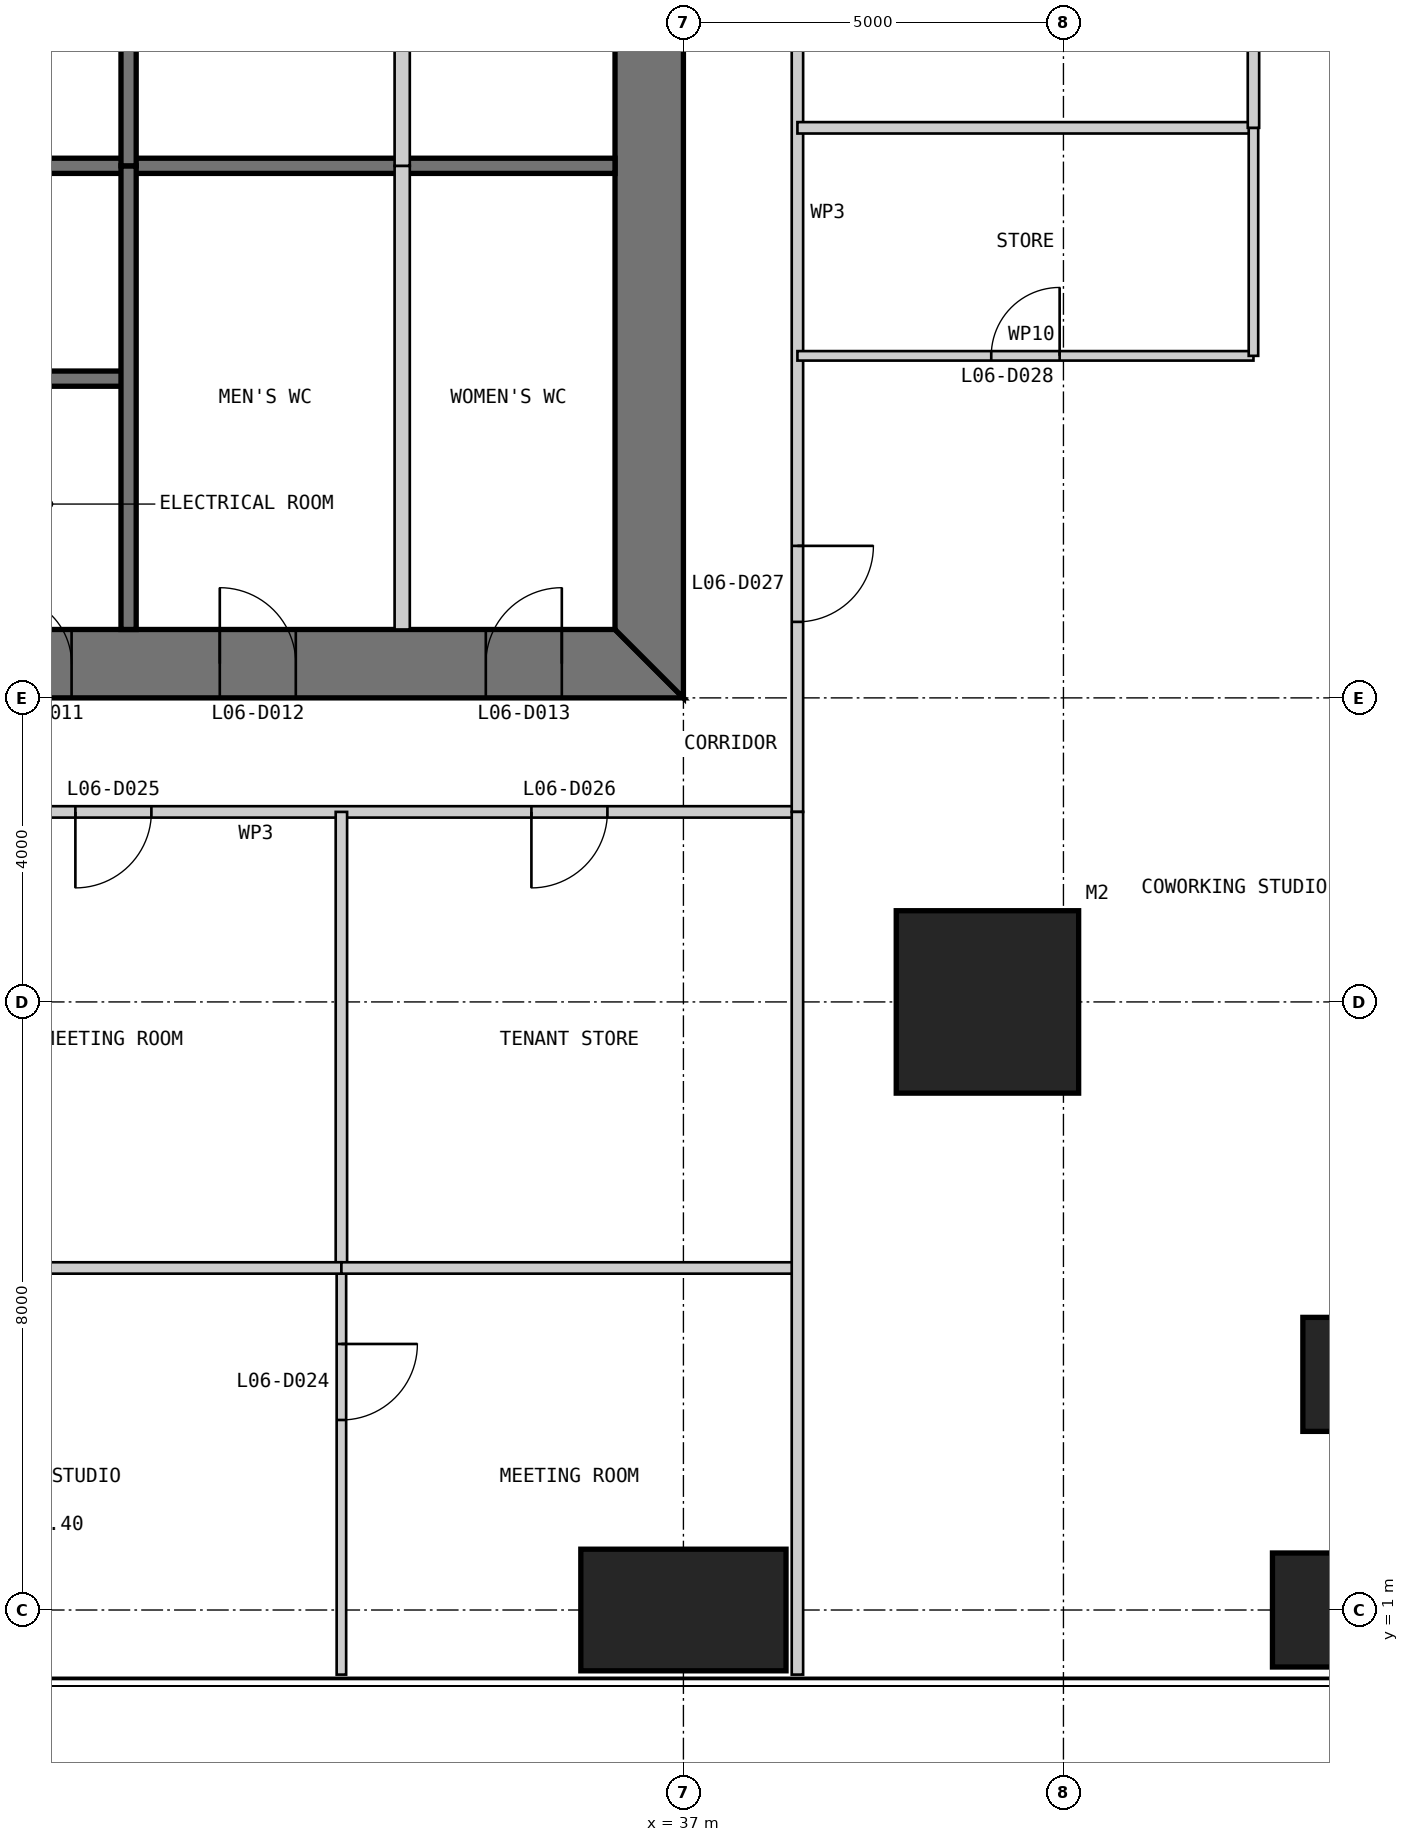
"""IFC4 building model, lengths in metres.
Left out: names, types, materials, properties, quantities, classifications, styles, units other than length and angle.
Written with IfcOpenShell. Run it as: python <this file> out.ifc"""

import sys

from ifc_helpers import new_model, si_unit, direction, frame, frame_2d, origin, origin_2d, place, context, subcontext, project, spatial, polyline, rectangle, outline, extrude, element, fill, save


model = new_model("IFC4")
c1 = context("Model", 3, precision=1e-05, world=origin(), true_north=direction((0.0, 1.0)))
c2 = subcontext(c1, "Body", "Model", "MODEL_VIEW")
j1 = project(units=[si_unit("LENGTHUNIT", "METRE"), si_unit("PLANEANGLEUNIT", "RADIAN")], contexts=[c1])
p1 = place(None, origin())
s1 = spatial("IfcSite", under=j1, at=p1, CompositionType="ELEMENT")
p2 = place(p1, origin())
s2 = spatial("IfcBuilding", under=s1, at=p2, CompositionType="ELEMENT")
p3 = place(p2, frame((0.0, 0.0, 31.0)))
s3 = spatial("IfcBuildingStorey", under=s2, at=p3, CompositionType="ELEMENT", Elevation=31.0)
p4 = place(p3, frame((41.0, 9.0, 0.0), z_axis=(0.0, 0.0, 1.0), x_axis=(1.0, 0.0, 0.0)))
e1 = element("IfcColumn", 1, at=p4, inside=s3, PredefinedType="COLUMN", context=c2, shape_type="SweptSolid", body=[
    extrude(rectangle(XDim=2.4, YDim=2.4, at=origin_2d()), origin(), (0.0, 0.0, 1.0), 4.0),
])
p5 = place(p3, frame((37.0, 1.0, 0.0), z_axis=(0.0, 0.0, 1.0), x_axis=(1.0, 0.0, 0.0)))
e2 = element("IfcColumn", 2, at=p5, inside=s3, PredefinedType="COLUMN", context=c2, shape_type="SweptSolid", body=[
    extrude(rectangle(XDim=2.7, YDim=1.6, at=origin_2d()), origin(), (0.0, 0.0, 1.0), 4.0),
])
for number, where, z_axis, x_axis in (
    (3, (45.5, 1.0, 0.0), (0.0, 0.0, 1.0), (1.0, 0.0, 0.0)),
    (4, (45.9, 4.1, 0.0), (0.0, 0.0, 1.0), (1.0, 0.0, 0.0)),
):
    element("IfcColumn", number, at=place(p3, frame(where, z_axis=z_axis, x_axis=x_axis)), inside=s3, PredefinedType="COLUMN", context=c2, shape_type="SweptSolid", body=[
        extrude(rectangle(XDim=1.5, YDim=1.5, at=origin_2d()), origin(), (0.0, 0.0, 1.0), 4.0),
    ])
p6 = place(p3, frame((13.0, 13.45, 0.0), z_axis=(0.0, 0.0, 1.0), x_axis=(1.0, 0.0, 0.0)))
e5 = element("IfcWall", 5, at=p6, inside=s3, PredefinedType="SHEAR", context=c2, shape_type="SweptSolid", body=[
    extrude(outline(polyline([(0.0, -0.45), (24.0, -0.45), (23.1, 0.45), (0.9, 0.45), (0.0, -0.45)])), origin(), (0.0, 0.0, 1.0), 4.0),
])
p7 = place(p6, frame((4.9, 0.0, 0.0)))
e6 = element("IfcOpeningElement", 6, at=p7, cuts=e5, PredefinedType="OPENING", context=c2, shape_type="SweptSolid", body=[
    extrude(rectangle(XDim=1.0, YDim=2.2, at=frame_2d((0.5, 1.1))), frame((0.0, 0.46, 0.0), z_axis=(0.0, -1.0, 0.0), x_axis=(1.0, 0.0, 0.0)), (0.0, 0.0, 1.0), 0.92),
])
p8 = place(p6, frame((8.9, 0.0, 0.0)))
e7 = element("IfcOpeningElement", 7, at=p8, cuts=e5, PredefinedType="OPENING", context=c2, shape_type="SweptSolid", body=[
    extrude(rectangle(XDim=1.1, YDim=2.2, at=frame_2d((0.55, 1.1))), frame((0.0, 0.46, 0.0), z_axis=(0.0, -1.0, 0.0), x_axis=(1.0, 0.0, 0.0)), (0.0, 0.0, 1.0), 0.92),
])
p9 = place(p6, frame((15.05, 0.0, 0.0)))
e8 = element("IfcOpeningElement", 8, at=p9, cuts=e5, PredefinedType="OPENING", context=c2, shape_type="SweptSolid", body=[
    extrude(rectangle(XDim=0.9, YDim=2.2, at=frame_2d((0.45, 1.1))), frame((0.0, 0.46, 0.0), z_axis=(0.0, -1.0, 0.0), x_axis=(1.0, 0.0, 0.0)), (0.0, 0.0, 1.0), 0.92),
])
p10 = place(p6, frame((17.9, 0.0, 0.0)))
e9 = element("IfcOpeningElement", 9, at=p10, cuts=e5, PredefinedType="OPENING", context=c2, shape_type="SweptSolid", body=[
    extrude(rectangle(XDim=1.0, YDim=2.2, at=frame_2d((0.5, 1.1))), frame((0.0, 0.46, 0.0), z_axis=(0.0, -1.0, 0.0), x_axis=(1.0, 0.0, 0.0)), (0.0, 0.0, 1.0), 0.92),
])
p11 = place(p6, frame((21.4, 0.0, 0.0)))
e10 = element("IfcOpeningElement", 10, at=p11, cuts=e5, PredefinedType="OPENING", context=c2, shape_type="SweptSolid", body=[
    extrude(rectangle(XDim=1.0, YDim=2.2, at=frame_2d((0.5, 1.1))), frame((0.0, 0.46, 0.0), z_axis=(0.0, -1.0, 0.0), x_axis=(1.0, 0.0, 0.0)), (0.0, 0.0, 1.0), 0.92),
])
p12 = place(p3, frame((36.55, 13.9, 0.0), z_axis=(0.0, 0.0, 1.0), x_axis=(0.0, 1.0, 0.0)))
e11 = element("IfcWall", 11, at=p12, inside=s3, PredefinedType="SHEAR", context=c2, shape_type="SweptSolid", body=[
    extrude(outline(polyline([(-0.9, -0.45), (23.1, -0.45), (22.2, 0.45), (0.0, 0.45), (-0.9, -0.45)])), origin(), (0.0, 0.0, 1.0), 4.0),
])
p13 = place(p12, frame((20.2, 0.0, 0.0)))
e12 = element("IfcOpeningElement", 12, at=p13, cuts=e11, PredefinedType="OPENING", context=c2, shape_type="SweptSolid", body=[
    extrude(rectangle(XDim=1.0, YDim=2.2, at=frame_2d((0.5, 1.1))), frame((0.0, 0.46, 0.0), z_axis=(0.0, -1.0, 0.0), x_axis=(1.0, 0.0, 0.0)), (0.0, 0.0, 1.0), 0.92),
])
p14 = place(p12, frame((17.25, 0.0, 0.0)))
e13 = element("IfcOpeningElement", 13, at=p14, cuts=e11, PredefinedType="OPENING", context=c2, shape_type="SweptSolid", body=[
    extrude(rectangle(XDim=0.9, YDim=2.2, at=frame_2d((0.45, 1.1))), frame((0.0, 0.46, 0.0), z_axis=(0.0, -1.0, 0.0), x_axis=(1.0, 0.0, 0.0)), (0.0, 0.0, 1.0), 0.92),
])
p15 = place(p3, frame((20.3, 17.2, 0.0), z_axis=(0.0, 0.0, 1.0), x_axis=(1.0, 0.0, 0.0)))
e14 = element("IfcWall", 14, at=p15, inside=s3, PredefinedType="SOLIDWALL", context=c2, shape_type="SweptSolid", body=[
    extrude(rectangle(XDim=9.4, YDim=0.2, at=frame_2d((4.7, 0.0))), origin(), (0.0, 0.0, 1.0), 3.8),
])
p16 = place(p15, frame((0.25, 0.0, 0.0)))
e15 = element("IfcOpeningElement", 15, at=p16, cuts=e14, PredefinedType="OPENING", context=c2, shape_type="SweptSolid", body=[
    extrude(rectangle(XDim=1.0, YDim=2.2, at=frame_2d((0.5, 1.1))), frame((0.0, 0.11, 0.0), z_axis=(0.0, -1.0, 0.0), x_axis=(1.0, 0.0, 0.0)), (0.0, 0.0, 1.0), 0.22),
])
p17 = place(p3, frame((20.3, 20.0, 0.0), z_axis=(0.0, 0.0, 1.0), x_axis=(1.0, 0.0, 0.0)))
e16 = element("IfcWall", 16, at=p17, inside=s3, PredefinedType="SOLIDWALL", context=c2, shape_type="SweptSolid", body=[
    extrude(rectangle(XDim=15.8, YDim=0.2, at=frame_2d((7.9, 0.0))), origin(), (0.0, 0.0, 1.0), 3.8),
])
p18 = place(p3, frame((29.7, 13.9, 0.0), z_axis=(0.0, 0.0, 1.0), x_axis=(0.0, 1.0, 0.0)))
e17 = element("IfcWall", 17, at=p18, inside=s3, PredefinedType="SOLIDWALL", context=c2, shape_type="SweptSolid", body=[
    extrude(rectangle(XDim=6.1, YDim=0.2, at=frame_2d((3.05, 0.0))), origin(), (0.0, 0.0, 1.0), 3.8),
])
p19 = place(p3, frame((33.3, 13.9, 0.0), z_axis=(0.0, 0.0, 1.0), x_axis=(0.0, 1.0, 0.0)))
e18 = element("IfcWall", 18, at=p19, inside=s3, PredefinedType="PARTITIONING", context=c2, shape_type="SweptSolid", body=[
    extrude(rectangle(XDim=6.1, YDim=0.2, at=frame_2d((3.05, 0.0))), origin(), (0.0, 0.0, 1.0), 3.8),
])
p20 = place(p3, frame((33.3, 36.1, 0.0), z_axis=(0.0, 0.0, 1.0), x_axis=(0.0, -1.0, 0.0)))
e19 = element("IfcWall", 19, at=p20, inside=s3, PredefinedType="PARTITIONING", context=c2, shape_type="SweptSolid", body=[
    extrude(rectangle(XDim=16.1, YDim=0.2, at=frame_2d((8.05, 0.0))), origin(), (0.0, 0.0, 1.0), 3.8),
])
p21 = place(p3, frame((29.7, 36.1, 0.0), z_axis=(0.0, 0.0, 1.0), x_axis=(0.0, -1.0, 0.0)))
e20 = element("IfcWall", 20, at=p21, inside=s3, PredefinedType="SOLIDWALL", context=c2, shape_type="SweptSolid", body=[
    extrude(rectangle(XDim=16.1, YDim=0.2, at=frame_2d((8.05, 0.0))), origin(), (0.0, 0.0, 1.0), 3.8),
])
p22 = place(p3, frame((11.5, 11.5, 0.0), z_axis=(0.0, 0.0, 1.0), x_axis=(1.0, 0.0, 0.0)))
e21 = element("IfcWall", 21, at=p22, inside=s3, PredefinedType="PARTITIONING", context=c2, shape_type="SweptSolid", body=[
    extrude(rectangle(XDim=27.0, YDim=0.15, at=frame_2d((13.5, 0.0))), origin(), (0.0, 0.0, 1.0), 3.85),
])
p23 = place(p22, frame((5.5, 0.0, 0.0)))
e22 = element("IfcOpeningElement", 22, at=p23, cuts=e21, PredefinedType="OPENING", context=c2, shape_type="SweptSolid", body=[
    extrude(rectangle(XDim=1.0, YDim=2.2, at=frame_2d((0.5, 1.1))), frame((0.0, 0.085, 0.0), z_axis=(0.0, -1.0, 0.0), x_axis=(1.0, 0.0, 0.0)), (0.0, 0.0, 1.0), 0.17),
])
p24 = place(p22, frame((17.5, 0.0, 0.0)))
e23 = element("IfcOpeningElement", 23, at=p24, cuts=e21, PredefinedType="OPENING", context=c2, shape_type="SweptSolid", body=[
    extrude(rectangle(XDim=1.0, YDim=2.2, at=frame_2d((0.5, 1.1))), frame((0.0, 0.085, 0.0), z_axis=(0.0, -1.0, 0.0), x_axis=(1.0, 0.0, 0.0)), (0.0, 0.0, 1.0), 0.17),
])
p25 = place(p22, frame((23.5, 0.0, 0.0)))
e24 = element("IfcOpeningElement", 24, at=p25, cuts=e21, PredefinedType="OPENING", context=c2, shape_type="SweptSolid", body=[
    extrude(rectangle(XDim=1.0, YDim=2.2, at=frame_2d((0.5, 1.1))), frame((0.0, 0.085, 0.0), z_axis=(0.0, -1.0, 0.0), x_axis=(1.0, 0.0, 0.0)), (0.0, 0.0, 1.0), 0.17),
])
p26 = place(p3, frame((32.5, 0.15, 0.0), z_axis=(0.0, 0.0, 1.0), x_axis=(0.0, 1.0, 0.0)))
e25 = element("IfcWall", 25, at=p26, inside=s3, PredefinedType="PARTITIONING", context=c2, shape_type="SweptSolid", body=[
    extrude(rectangle(XDim=5.35, YDim=0.125, at=frame_2d((2.675, 0.0))), origin(), (0.0, 0.0, 1.0), 3.85),
])
p27 = place(p26, frame((3.35, 0.0, 0.0)))
e26 = element("IfcOpeningElement", 26, at=p27, cuts=e25, PredefinedType="OPENING", context=c2, shape_type="SweptSolid", body=[
    extrude(rectangle(XDim=1.0, YDim=2.2, at=frame_2d((0.5, 1.1))), frame((0.0, 0.073, 0.0), z_axis=(0.0, -1.0, 0.0), x_axis=(1.0, 0.0, 0.0)), (0.0, 0.0, 1.0), 0.145),
])
for number, where, z_axis, x_axis in (
    (27, (32.5, 5.5, 0.0), (0.0, 0.0, 1.0), (0.0, 1.0, 0.0)),
    (28, (26.5, 5.5, 0.0), (0.0, 0.0, 1.0), (1.0, 0.0, 0.0)),
    (29, (32.5, 5.5, 0.0), (0.0, 0.0, 1.0), (1.0, 0.0, 0.0)),
):
    element("IfcWall", number, at=place(p3, frame(where, z_axis=z_axis, x_axis=x_axis)), inside=s3, PredefinedType="PARTITIONING", context=c2, shape_type="SweptSolid", body=[
        extrude(rectangle(XDim=6.0, YDim=0.15, at=frame_2d((3.0, 0.0))), origin(), (0.0, 0.0, 1.0), 3.85),
    ])
p28 = place(p3, frame((38.5, 11.5, 0.0), z_axis=(0.0, 0.0, 1.0), x_axis=(0.0, 1.0, 0.0)))
e30 = element("IfcWall", 30, at=p28, inside=s3, PredefinedType="PARTITIONING", context=c2, shape_type="SweptSolid", body=[
    extrude(rectangle(XDim=27.0, YDim=0.15, at=frame_2d((13.5, 0.0))), origin(), (0.0, 0.0, 1.0), 3.85),
])
p29 = place(p28, frame((2.5, 0.0, 0.0)))
e31 = element("IfcOpeningElement", 31, at=p29, cuts=e30, PredefinedType="OPENING", context=c2, shape_type="SweptSolid", body=[
    extrude(rectangle(XDim=1.0, YDim=2.2, at=frame_2d((0.5, 1.1))), frame((0.0, 0.085, 0.0), z_axis=(0.0, -1.0, 0.0), x_axis=(1.0, 0.0, 0.0)), (0.0, 0.0, 1.0), 0.17),
])
p30 = place(p28, frame((11.5, 0.0, 0.0)))
e32 = element("IfcOpeningElement", 32, at=p30, cuts=e30, PredefinedType="OPENING", context=c2, shape_type="SweptSolid", body=[
    extrude(rectangle(XDim=1.0, YDim=2.2, at=frame_2d((0.5, 1.1))), frame((0.0, 0.085, 0.0), z_axis=(0.0, -1.0, 0.0), x_axis=(1.0, 0.0, 0.0)), (0.0, 0.0, 1.0), 0.17),
])
p31 = place(p28, frame((17.5, 0.0, 0.0)))
e33 = element("IfcOpeningElement", 33, at=p31, cuts=e30, PredefinedType="OPENING", context=c2, shape_type="SweptSolid", body=[
    extrude(rectangle(XDim=1.0, YDim=2.2, at=frame_2d((0.5, 1.1))), frame((0.0, 0.085, 0.0), z_axis=(0.0, -1.0, 0.0), x_axis=(1.0, 0.0, 0.0)), (0.0, 0.0, 1.0), 0.17),
])
p32 = place(p28, frame((22.0, 0.0, 0.0)))
e34 = element("IfcOpeningElement", 34, at=p32, cuts=e30, PredefinedType="OPENING", context=c2, shape_type="SweptSolid", body=[
    extrude(rectangle(XDim=1.0, YDim=2.2, at=frame_2d((0.5, 1.1))), frame((0.0, 0.085, 0.0), z_axis=(0.0, -1.0, 0.0), x_axis=(1.0, 0.0, 0.0)), (0.0, 0.0, 1.0), 0.17),
])
p33 = place(p28, frame((25.0, 0.0, 0.0)))
e35 = element("IfcOpeningElement", 35, at=p33, cuts=e30, PredefinedType="OPENING", context=c2, shape_type="SweptSolid", body=[
    extrude(rectangle(XDim=1.0, YDim=2.2, at=frame_2d((0.5, 1.1))), frame((0.0, 0.085, 0.0), z_axis=(0.0, -1.0, 0.0), x_axis=(1.0, 0.0, 0.0)), (0.0, 0.0, 1.0), 0.17),
])
p34 = place(p3, frame((38.5, 0.15, 0.0), z_axis=(0.0, 0.0, 1.0), x_axis=(0.0, 1.0, 0.0)))
e36 = element("IfcWall", 36, at=p34, inside=s3, PredefinedType="PARTITIONING", context=c2, shape_type="SweptSolid", body=[
    extrude(rectangle(XDim=11.35, YDim=0.15, at=frame_2d((5.675, 0.0))), origin(), (0.0, 0.0, 1.0), 3.85),
])
p35 = place(p3, frame((44.5, 17.5, 0.0), z_axis=(0.0, 0.0, 1.0), x_axis=(-1.0, 0.0, 0.0)))
e37 = element("IfcWall", 37, at=p35, inside=s3, PredefinedType="PARTITIONING", context=c2, shape_type="SweptSolid", body=[
    extrude(rectangle(XDim=6.0, YDim=0.125, at=frame_2d((3.0, 0.0))), origin(), (0.0, 0.0, 1.0), 3.85),
])
p36 = place(p35, frame((2.55, 0.0, 0.0)))
e38 = element("IfcOpeningElement", 38, at=p36, cuts=e37, PredefinedType="OPENING", context=c2, shape_type="SweptSolid", body=[
    extrude(rectangle(XDim=0.9, YDim=2.2, at=frame_2d((0.45, 1.1))), frame((0.0, 0.073, 0.0), z_axis=(0.0, -1.0, 0.0), x_axis=(1.0, 0.0, 0.0)), (0.0, 0.0, 1.0), 0.145),
])
p37 = place(p3, frame((44.5, 20.5, 0.0), z_axis=(0.0, 0.0, 1.0), x_axis=(-1.0, 0.0, 0.0)))
e39 = element("IfcWall", 39, at=p37, inside=s3, PredefinedType="PARTITIONING", context=c2, shape_type="SweptSolid", body=[
    extrude(rectangle(XDim=6.0, YDim=0.15, at=frame_2d((3.0, 0.0))), origin(), (0.0, 0.0, 1.0), 3.85),
])
p38 = place(p3, frame((44.5, 17.5, 0.0), z_axis=(0.0, 0.0, 1.0), x_axis=(0.0, 1.0, 0.0)))
e40 = element("IfcWall", 40, at=p38, inside=s3, PredefinedType="PARTITIONING", context=c2, shape_type="SweptSolid", body=[
    extrude(rectangle(XDim=3.0, YDim=0.125, at=frame_2d((1.5, 0.0))), origin(), (0.0, 0.0, 1.0), 3.85),
])
p39 = place(p3, frame((44.5, 20.5, 0.0), z_axis=(0.0, 0.0, 1.0), x_axis=(0.0, 1.0, 0.0)))
e41 = element("IfcWall", 41, at=p39, inside=s3, PredefinedType="PARTITIONING", context=c2, shape_type="SweptSolid", body=[
    extrude(rectangle(XDim=6.0, YDim=0.15, at=frame_2d((3.0, 0.0))), origin(), (0.0, 0.0, 1.0), 3.85),
])
p40 = place(p9, origin())
e42 = element("IfcDoor", 42, at=p40, inside=s3, OperationType="SINGLE_SWING_LEFT", PredefinedType="DOOR", context=c2, shape_type="SweptSolid", body=[
    extrude(rectangle(XDim=0.9, YDim=2.2, at=frame_2d((0.45, 1.1))), frame((0.0, 0.025, 0.0), z_axis=(0.0, -1.0, 0.0), x_axis=(1.0, 0.0, 0.0)), (0.0, 0.0, 1.0), 0.05),
    extrude(outline(polyline([(0.0, 0.0), (0.04, 0.0), (0.04, 2.16), (0.86, 2.16), (0.86, 0.0), (0.9, 0.0), (0.9, 2.2), (0.0, 2.2), (0.0, 0.0)])), frame((0.0, 0.3, 0.0), z_axis=(0.0, -1.0, 0.0), x_axis=(1.0, 0.0, 0.0)), (0.0, 0.0, 1.0), 0.6),
])
fill(e8, e42)
p41 = place(p10, origin())
e43 = element("IfcDoor", 43, at=p41, inside=s3, OperationType="SINGLE_SWING_LEFT", PredefinedType="DOOR", context=c2, shape_type="SweptSolid", body=[
    extrude(rectangle(XDim=1.0, YDim=2.2, at=frame_2d((0.5, 1.1))), frame((0.0, 0.025, 0.0), z_axis=(0.0, -1.0, 0.0), x_axis=(1.0, 0.0, 0.0)), (0.0, 0.0, 1.0), 0.05),
    extrude(outline(polyline([(0.0, 0.0), (0.04, 0.0), (0.04, 2.16), (0.96, 2.16), (0.96, 0.0), (1.0, 0.0), (1.0, 2.2), (0.0, 2.2), (0.0, 0.0)])), frame((0.0, 0.3, 0.0), z_axis=(0.0, -1.0, 0.0), x_axis=(1.0, 0.0, 0.0)), (0.0, 0.0, 1.0), 0.6),
])
fill(e9, e43)
p42 = place(p11, origin())
e44 = element("IfcDoor", 44, at=p42, inside=s3, OperationType="SINGLE_SWING_RIGHT", PredefinedType="DOOR", context=c2, shape_type="SweptSolid", body=[
    extrude(rectangle(XDim=1.0, YDim=2.2, at=frame_2d((0.5, 1.1))), frame((0.0, 0.025, 0.0), z_axis=(0.0, -1.0, 0.0), x_axis=(1.0, 0.0, 0.0)), (0.0, 0.0, 1.0), 0.05),
    extrude(outline(polyline([(0.0, 0.0), (0.04, 0.0), (0.04, 2.16), (0.96, 2.16), (0.96, 0.0), (1.0, 0.0), (1.0, 2.2), (0.0, 2.2), (0.0, 0.0)])), frame((0.0, 0.3, 0.0), z_axis=(0.0, -1.0, 0.0), x_axis=(1.0, 0.0, 0.0)), (0.0, 0.0, 1.0), 0.6),
])
fill(e10, e44)
p43 = place(p27, frame((1.0, 0.0, 0.0), z_axis=(0.0, 0.0, 1.0), x_axis=(-1.0, 0.0, 0.0)))
e45 = element("IfcDoor", 45, at=p43, inside=s3, OperationType="SINGLE_SWING_LEFT", PredefinedType="DOOR", context=c2, shape_type="SweptSolid", body=[
    extrude(rectangle(XDim=1.0, YDim=2.2, at=frame_2d((0.5, 1.1))), frame((0.0, 0.025, 0.0), z_axis=(0.0, -1.0, 0.0), x_axis=(1.0, 0.0, 0.0)), (0.0, 0.0, 1.0), 0.05),
])
fill(e26, e45)
p44 = place(p24, frame((1.0, 0.0, 0.0), z_axis=(0.0, 0.0, 1.0), x_axis=(-1.0, 0.0, 0.0)))
e46 = element("IfcDoor", 46, at=p44, inside=s3, OperationType="SINGLE_SWING_RIGHT", PredefinedType="DOOR", context=c2, shape_type="SweptSolid", body=[
    extrude(rectangle(XDim=1.0, YDim=2.2, at=frame_2d((0.5, 1.1))), frame((0.0, 0.025, 0.0), z_axis=(0.0, -1.0, 0.0), x_axis=(1.0, 0.0, 0.0)), (0.0, 0.0, 1.0), 0.05),
])
fill(e23, e46)
p45 = place(p25, frame((1.0, 0.0, 0.0), z_axis=(0.0, 0.0, 1.0), x_axis=(-1.0, 0.0, 0.0)))
e47 = element("IfcDoor", 47, at=p45, inside=s3, OperationType="SINGLE_SWING_RIGHT", PredefinedType="DOOR", context=c2, shape_type="SweptSolid", body=[
    extrude(rectangle(XDim=1.0, YDim=2.2, at=frame_2d((0.5, 1.1))), frame((0.0, 0.025, 0.0), z_axis=(0.0, -1.0, 0.0), x_axis=(1.0, 0.0, 0.0)), (0.0, 0.0, 1.0), 0.05),
])
fill(e24, e47)
p46 = place(p29, frame((1.0, 0.0, 0.0), z_axis=(0.0, 0.0, 1.0), x_axis=(-1.0, 0.0, 0.0)))
e48 = element("IfcDoor", 48, at=p46, inside=s3, OperationType="SINGLE_SWING_LEFT", PredefinedType="DOOR", context=c2, shape_type="SweptSolid", body=[
    extrude(rectangle(XDim=1.0, YDim=2.2, at=frame_2d((0.5, 1.1))), frame((0.0, 0.025, 0.0), z_axis=(0.0, -1.0, 0.0), x_axis=(1.0, 0.0, 0.0)), (0.0, 0.0, 1.0), 0.05),
])
fill(e31, e48)
p47 = place(p36, frame((0.9, 0.0, 0.0), z_axis=(0.0, 0.0, 1.0), x_axis=(-1.0, 0.0, 0.0)))
e49 = element("IfcDoor", 49, at=p47, inside=s3, OperationType="SINGLE_SWING_RIGHT", PredefinedType="DOOR", context=c2, shape_type="SweptSolid", body=[
    extrude(rectangle(XDim=0.9, YDim=2.2, at=frame_2d((0.45, 1.1))), frame((0.0, 0.025, 0.0), z_axis=(0.0, -1.0, 0.0), x_axis=(1.0, 0.0, 0.0)), (0.0, 0.0, 1.0), 0.05),
])
fill(e38, e49)
save(model, sys.argv[1])
